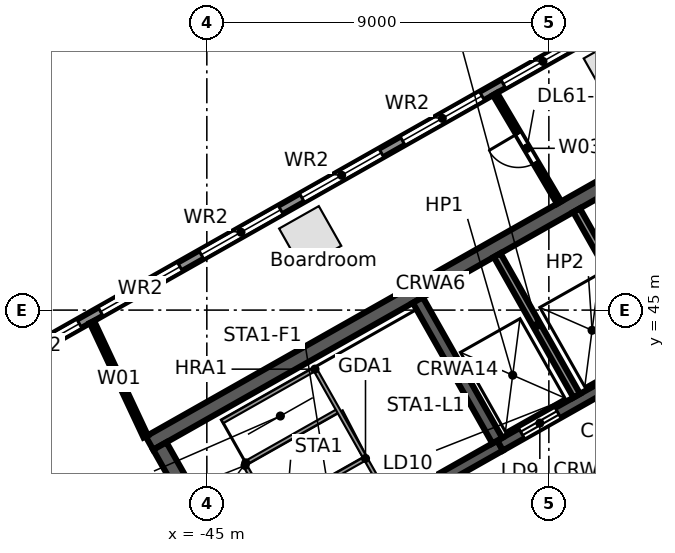
"""IFC4 building model, lengths in metres.
Left out: names, types, materials, properties, quantities, classifications, styles, units other than length and angle.
Written with IfcOpenShell. Run it as: python <this file> out.ifc"""

import sys

from ifc_helpers import new_model, si_unit, direction, frame, frame_2d, origin, origin_2d, place, context, subcontext, project, spatial, rectangle, extrude, element, fill, save


model = new_model("IFC4")
c1 = context("Model", 3, precision=1e-05, world=origin(), true_north=direction((0.0, 1.0)))
c2 = subcontext(c1, "Body", "Model", "MODEL_VIEW")
j1 = project(units=[si_unit("LENGTHUNIT", "METRE"), si_unit("PLANEANGLEUNIT", "RADIAN")], contexts=[c1])
p1 = place(None, origin())
s1 = spatial("IfcSite", under=j1, at=p1, CompositionType="ELEMENT")
p2 = place(p1, origin())
s2 = spatial("IfcBuilding", under=s1, at=p2, CompositionType="ELEMENT")
p3 = place(p2, frame((0.0, 0.0, 281.7)))
s3 = spatial("IfcBuildingStorey", under=s2, at=p3, CompositionType="ELEMENT", Elevation=281.7)
p4 = place(p3, frame((-34.334, 51.414, 0.0), z_axis=(0.0, 0.0, 1.0), x_axis=(-0.87035569594, -0.492423560103, 0.0)))
e1 = element("IfcColumn", 1, at=p4, inside=s3, PredefinedType="COLUMN", context=c2, shape_type="SweptSolid", body=[
    extrude(rectangle(XDim=1.1, YDim=1.1, at=origin_2d()), origin(), (0.0, 0.0, 1.0), 3.8),
])
p5 = place(p3, frame((-42.28, 46.919, 0.0), z_axis=(0.0, 0.0, 1.0), x_axis=(-0.87035569594, -0.492423560103, 0.0)))
e2 = element("IfcColumn", 2, at=p5, inside=s3, PredefinedType="COLUMN", context=c2, shape_type="SweptSolid", body=[
    extrude(rectangle(XDim=1.2, YDim=1.2, at=origin_2d()), origin(), (0.0, 0.0, 1.0), 3.8),
])
p6 = place(p3, frame((-58.732, 38.771, 0.0), z_axis=(0.0, 0.0, 1.0), x_axis=(0.870355615581, 0.492423702137, 0.0)))
e3 = element("IfcWall", 3, at=p6, inside=s3, PredefinedType="STANDARD", context=c2, shape_type="SweptSolid", body=[
    extrude(rectangle(XDim=64.052, YDim=0.25, at=frame_2d((32.026, 0.0))), origin(), (0.0, 0.0, 1.0), 3.45),
])
p7 = place(p6, frame((61.259, 0.0, 0.8)))
e4 = element("IfcOpeningElement", 4, at=p7, cuts=e3, PredefinedType="OPENING", context=c2, shape_type="SweptSolid", body=[
    extrude(rectangle(XDim=2.4, YDim=2.2, at=frame_2d((1.2, 1.1))), frame((0.0, 0.135, 0.0), z_axis=(0.0, -1.0, 0.0), x_axis=(1.0, 0.0, 0.0)), (0.0, 0.0, 1.0), 0.27),
])
p8 = place(p6, frame((58.216, 0.0, 0.8)))
e5 = element("IfcOpeningElement", 5, at=p8, cuts=e3, PredefinedType="OPENING", context=c2, shape_type="SweptSolid", body=[
    extrude(rectangle(XDim=2.4, YDim=2.2, at=frame_2d((1.2, 1.1))), frame((0.0, 0.135, 0.0), z_axis=(0.0, -1.0, 0.0), x_axis=(1.0, 0.0, 0.0)), (0.0, 0.0, 1.0), 0.27),
])
p9 = place(p6, frame((55.173, 0.0, 0.8)))
e6 = element("IfcOpeningElement", 6, at=p9, cuts=e3, PredefinedType="OPENING", context=c2, shape_type="SweptSolid", body=[
    extrude(rectangle(XDim=2.4, YDim=2.2, at=frame_2d((1.2, 1.1))), frame((0.0, 0.135, 0.0), z_axis=(0.0, -1.0, 0.0), x_axis=(1.0, 0.0, 0.0)), (0.0, 0.0, 1.0), 0.27),
])
p10 = place(p6, frame((52.129, 0.0, 0.8)))
e7 = element("IfcOpeningElement", 7, at=p10, cuts=e3, PredefinedType="OPENING", context=c2, shape_type="SweptSolid", body=[
    extrude(rectangle(XDim=2.4, YDim=2.2, at=frame_2d((1.2, 1.1))), frame((0.0, 0.135, 0.0), z_axis=(0.0, -1.0, 0.0), x_axis=(1.0, 0.0, 0.0)), (0.0, 0.0, 1.0), 0.27),
])
p11 = place(p6, frame((49.086, 0.0, 0.8)))
e8 = element("IfcOpeningElement", 8, at=p11, cuts=e3, PredefinedType="OPENING", context=c2, shape_type="SweptSolid", body=[
    extrude(rectangle(XDim=2.4, YDim=2.2, at=frame_2d((1.2, 1.1))), frame((0.0, 0.135, 0.0), z_axis=(0.0, -1.0, 0.0), x_axis=(1.0, 0.0, 0.0)), (0.0, 0.0, 1.0), 0.27),
])
p12 = place(p6, frame((46.043, 0.0, 0.8)))
e9 = element("IfcOpeningElement", 9, at=p12, cuts=e3, PredefinedType="OPENING", context=c2, shape_type="SweptSolid", body=[
    extrude(rectangle(XDim=2.4, YDim=2.2, at=frame_2d((1.2, 1.1))), frame((0.0, 0.135, 0.0), z_axis=(0.0, -1.0, 0.0), x_axis=(1.0, 0.0, 0.0)), (0.0, 0.0, 1.0), 0.27),
])
p13 = place(p6, frame((43.0, 0.0, 0.8)))
e10 = element("IfcOpeningElement", 10, at=p13, cuts=e3, PredefinedType="OPENING", context=c2, shape_type="SweptSolid", body=[
    extrude(rectangle(XDim=2.4, YDim=2.2, at=frame_2d((1.2, 1.1))), frame((0.0, 0.135, 0.0), z_axis=(0.0, -1.0, 0.0), x_axis=(1.0, 0.0, 0.0)), (0.0, 0.0, 1.0), 0.27),
])
p14 = place(p6, frame((39.956, 0.0, 0.8)))
e11 = element("IfcOpeningElement", 11, at=p14, cuts=e3, PredefinedType="OPENING", context=c2, shape_type="SweptSolid", body=[
    extrude(rectangle(XDim=2.4, YDim=2.2, at=frame_2d((1.2, 1.1))), frame((0.0, 0.135, 0.0), z_axis=(0.0, -1.0, 0.0), x_axis=(1.0, 0.0, 0.0)), (0.0, 0.0, 1.0), 0.27),
])
p15 = place(p6, frame((36.913, 0.0, 0.8)))
e12 = element("IfcOpeningElement", 12, at=p15, cuts=e3, PredefinedType="OPENING", context=c2, shape_type="SweptSolid", body=[
    extrude(rectangle(XDim=2.4, YDim=2.2, at=frame_2d((1.2, 1.1))), frame((0.0, 0.135, 0.0), z_axis=(0.0, -1.0, 0.0), x_axis=(1.0, 0.0, 0.0)), (0.0, 0.0, 1.0), 0.27),
])
p16 = place(p6, frame((33.87, 0.0, 0.8)))
e13 = element("IfcOpeningElement", 13, at=p16, cuts=e3, PredefinedType="OPENING", context=c2, shape_type="SweptSolid", body=[
    extrude(rectangle(XDim=2.4, YDim=2.2, at=frame_2d((1.2, 1.1))), frame((0.0, 0.135, 0.0), z_axis=(0.0, -1.0, 0.0), x_axis=(1.0, 0.0, 0.0)), (0.0, 0.0, 1.0), 0.27),
])
p17 = place(p6, frame((30.826, 0.0, 0.8)))
e14 = element("IfcOpeningElement", 14, at=p17, cuts=e3, PredefinedType="OPENING", context=c2, shape_type="SweptSolid", body=[
    extrude(rectangle(XDim=2.4, YDim=2.2, at=frame_2d((1.2, 1.1))), frame((0.0, 0.135, 0.0), z_axis=(0.0, -1.0, 0.0), x_axis=(1.0, 0.0, 0.0)), (0.0, 0.0, 1.0), 0.27),
])
p18 = place(p6, frame((27.783, 0.0, 0.8)))
e15 = element("IfcOpeningElement", 15, at=p18, cuts=e3, PredefinedType="OPENING", context=c2, shape_type="SweptSolid", body=[
    extrude(rectangle(XDim=2.4, YDim=2.2, at=frame_2d((1.2, 1.1))), frame((0.0, 0.135, 0.0), z_axis=(0.0, -1.0, 0.0), x_axis=(1.0, 0.0, 0.0)), (0.0, 0.0, 1.0), 0.27),
])
p19 = place(p6, frame((24.74, 0.0, 0.8)))
e16 = element("IfcOpeningElement", 16, at=p19, cuts=e3, PredefinedType="OPENING", context=c2, shape_type="SweptSolid", body=[
    extrude(rectangle(XDim=2.4, YDim=2.2, at=frame_2d((1.2, 1.1))), frame((0.0, 0.135, 0.0), z_axis=(0.0, -1.0, 0.0), x_axis=(1.0, 0.0, 0.0)), (0.0, 0.0, 1.0), 0.27),
])
p20 = place(p6, frame((21.696, 0.0, 0.8)))
e17 = element("IfcOpeningElement", 17, at=p20, cuts=e3, PredefinedType="OPENING", context=c2, shape_type="SweptSolid", body=[
    extrude(rectangle(XDim=2.4, YDim=2.2, at=frame_2d((1.2, 1.1))), frame((0.0, 0.135, 0.0), z_axis=(0.0, -1.0, 0.0), x_axis=(1.0, 0.0, 0.0)), (0.0, 0.0, 1.0), 0.27),
])
p21 = place(p6, frame((18.653, 0.0, 0.8)))
e18 = element("IfcOpeningElement", 18, at=p21, cuts=e3, PredefinedType="OPENING", context=c2, shape_type="SweptSolid", body=[
    extrude(rectangle(XDim=2.4, YDim=2.2, at=frame_2d((1.2, 1.1))), frame((0.0, 0.135, 0.0), z_axis=(0.0, -1.0, 0.0), x_axis=(1.0, 0.0, 0.0)), (0.0, 0.0, 1.0), 0.27),
])
p22 = place(p6, frame((15.61, 0.0, 0.8)))
e19 = element("IfcOpeningElement", 19, at=p22, cuts=e3, PredefinedType="OPENING", context=c2, shape_type="SweptSolid", body=[
    extrude(rectangle(XDim=2.4, YDim=2.2, at=frame_2d((1.2, 1.1))), frame((0.0, 0.135, 0.0), z_axis=(0.0, -1.0, 0.0), x_axis=(1.0, 0.0, 0.0)), (0.0, 0.0, 1.0), 0.27),
])
p23 = place(p6, frame((12.567, 0.0, 0.8)))
e20 = element("IfcOpeningElement", 20, at=p23, cuts=e3, PredefinedType="OPENING", context=c2, shape_type="SweptSolid", body=[
    extrude(rectangle(XDim=2.4, YDim=2.2, at=frame_2d((1.2, 1.1))), frame((0.0, 0.135, 0.0), z_axis=(0.0, -1.0, 0.0), x_axis=(1.0, 0.0, 0.0)), (0.0, 0.0, 1.0), 0.27),
])
p24 = place(p6, frame((9.523, 0.0, 0.8)))
e21 = element("IfcOpeningElement", 21, at=p24, cuts=e3, PredefinedType="OPENING", context=c2, shape_type="SweptSolid", body=[
    extrude(rectangle(XDim=2.4, YDim=2.2, at=frame_2d((1.2, 1.1))), frame((0.0, 0.135, 0.0), z_axis=(0.0, -1.0, 0.0), x_axis=(1.0, 0.0, 0.0)), (0.0, 0.0, 1.0), 0.27),
])
p25 = place(p6, frame((6.48, 0.0, 0.8)))
e22 = element("IfcOpeningElement", 22, at=p25, cuts=e3, PredefinedType="OPENING", context=c2, shape_type="SweptSolid", body=[
    extrude(rectangle(XDim=2.4, YDim=2.2, at=frame_2d((1.2, 1.1))), frame((0.0, 0.135, 0.0), z_axis=(0.0, -1.0, 0.0), x_axis=(1.0, 0.0, 0.0)), (0.0, 0.0, 1.0), 0.27),
])
p26 = place(p6, frame((3.437, 0.0, 0.8)))
e23 = element("IfcOpeningElement", 23, at=p26, cuts=e3, PredefinedType="OPENING", context=c2, shape_type="SweptSolid", body=[
    extrude(rectangle(XDim=2.4, YDim=2.2, at=frame_2d((1.2, 1.1))), frame((0.0, 0.135, 0.0), z_axis=(0.0, -1.0, 0.0), x_axis=(1.0, 0.0, 0.0)), (0.0, 0.0, 1.0), 0.27),
])
p27 = place(p6, frame((0.393, 0.0, 0.8)))
e24 = element("IfcOpeningElement", 24, at=p27, cuts=e3, PredefinedType="OPENING", context=c2, shape_type="SweptSolid", body=[
    extrude(rectangle(XDim=2.4, YDim=2.2, at=frame_2d((1.2, 1.1))), frame((0.0, 0.135, 0.0), z_axis=(0.0, -1.0, 0.0), x_axis=(1.0, 0.0, 0.0)), (0.0, 0.0, 1.0), 0.27),
])
p28 = place(p3, frame((-3.017, 46.293, 0.0), z_axis=(0.0, 0.0, 1.0), x_axis=(-0.870355474887, -0.492423950812, 0.0)))
e25 = element("IfcWall", 25, at=p28, inside=s3, PredefinedType="STANDARD", context=c2, shape_type="SweptSolid", body=[
    extrude(rectangle(XDim=40.34, YDim=0.25, at=frame_2d((20.17, 0.0))), origin(), (0.0, 0.0, 1.0), 3.45),
])
p29 = place(p28, frame((37.428, 0.0, 0.8)))
e26 = element("IfcOpeningElement", 26, at=p29, cuts=e25, PredefinedType="OPENING", context=c2, shape_type="SweptSolid", body=[
    extrude(rectangle(XDim=2.4, YDim=2.2, at=frame_2d((1.2, 1.1))), frame((0.0, 0.135, 0.0), z_axis=(0.0, -1.0, 0.0), x_axis=(1.0, 0.0, 0.0)), (0.0, 0.0, 1.0), 0.27),
])
p30 = place(p28, frame((34.372, 0.0, 0.0)))
e27 = element("IfcOpeningElement", 27, at=p30, cuts=e25, PredefinedType="OPENING", context=c2, shape_type="SweptSolid", body=[
    extrude(rectangle(XDim=1.8, YDim=2.4, at=frame_2d((0.9, 1.2))), frame((0.0, 0.135, 0.0), z_axis=(0.0, -1.0, 0.0), x_axis=(1.0, 0.0, 0.0)), (0.0, 0.0, 1.0), 0.27),
])
p31 = place(p28, frame((30.716, 0.0, 0.8)))
e28 = element("IfcOpeningElement", 28, at=p31, cuts=e25, PredefinedType="OPENING", context=c2, shape_type="SweptSolid", body=[
    extrude(rectangle(XDim=2.4, YDim=2.2, at=frame_2d((1.2, 1.1))), frame((0.0, 0.135, 0.0), z_axis=(0.0, -1.0, 0.0), x_axis=(1.0, 0.0, 0.0)), (0.0, 0.0, 1.0), 0.27),
])
p32 = place(p28, frame((27.36, 0.0, 0.8)))
e29 = element("IfcOpeningElement", 29, at=p32, cuts=e25, PredefinedType="OPENING", context=c2, shape_type="SweptSolid", body=[
    extrude(rectangle(XDim=2.4, YDim=2.2, at=frame_2d((1.2, 1.1))), frame((0.0, 0.135, 0.0), z_axis=(0.0, -1.0, 0.0), x_axis=(1.0, 0.0, 0.0)), (0.0, 0.0, 1.0), 0.27),
])
p33 = place(p28, frame((24.304, 0.0, 0.0)))
e30 = element("IfcOpeningElement", 30, at=p33, cuts=e25, PredefinedType="OPENING", context=c2, shape_type="SweptSolid", body=[
    extrude(rectangle(XDim=1.8, YDim=2.4, at=frame_2d((0.9, 1.2))), frame((0.0, 0.135, 0.0), z_axis=(0.0, -1.0, 0.0), x_axis=(1.0, 0.0, 0.0)), (0.0, 0.0, 1.0), 0.27),
])
p34 = place(p28, frame((20.648, 0.0, 0.8)))
e31 = element("IfcOpeningElement", 31, at=p34, cuts=e25, PredefinedType="OPENING", context=c2, shape_type="SweptSolid", body=[
    extrude(rectangle(XDim=2.4, YDim=2.2, at=frame_2d((1.2, 1.1))), frame((0.0, 0.135, 0.0), z_axis=(0.0, -1.0, 0.0), x_axis=(1.0, 0.0, 0.0)), (0.0, 0.0, 1.0), 0.27),
])
p35 = place(p28, frame((17.292, 0.0, 0.8)))
e32 = element("IfcOpeningElement", 32, at=p35, cuts=e25, PredefinedType="OPENING", context=c2, shape_type="SweptSolid", body=[
    extrude(rectangle(XDim=2.4, YDim=2.2, at=frame_2d((1.2, 1.1))), frame((0.0, 0.135, 0.0), z_axis=(0.0, -1.0, 0.0), x_axis=(1.0, 0.0, 0.0)), (0.0, 0.0, 1.0), 0.27),
])
p36 = place(p28, frame((14.236, 0.0, 0.0)))
e33 = element("IfcOpeningElement", 33, at=p36, cuts=e25, PredefinedType="OPENING", context=c2, shape_type="SweptSolid", body=[
    extrude(rectangle(XDim=1.8, YDim=2.4, at=frame_2d((0.9, 1.2))), frame((0.0, 0.135, 0.0), z_axis=(0.0, -1.0, 0.0), x_axis=(1.0, 0.0, 0.0)), (0.0, 0.0, 1.0), 0.27),
])
p37 = place(p28, frame((10.58, 0.0, 0.8)))
e34 = element("IfcOpeningElement", 34, at=p37, cuts=e25, PredefinedType="OPENING", context=c2, shape_type="SweptSolid", body=[
    extrude(rectangle(XDim=2.4, YDim=2.2, at=frame_2d((1.2, 1.1))), frame((0.0, 0.135, 0.0), z_axis=(0.0, -1.0, 0.0), x_axis=(1.0, 0.0, 0.0)), (0.0, 0.0, 1.0), 0.27),
])
p38 = place(p28, frame((7.224, 0.0, 0.8)))
e35 = element("IfcOpeningElement", 35, at=p38, cuts=e25, PredefinedType="OPENING", context=c2, shape_type="SweptSolid", body=[
    extrude(rectangle(XDim=2.4, YDim=2.2, at=frame_2d((1.2, 1.1))), frame((0.0, 0.135, 0.0), z_axis=(0.0, -1.0, 0.0), x_axis=(1.0, 0.0, 0.0)), (0.0, 0.0, 1.0), 0.27),
])
p39 = place(p28, frame((4.168, 0.0, 0.0)))
e36 = element("IfcOpeningElement", 36, at=p39, cuts=e25, PredefinedType="OPENING", context=c2, shape_type="SweptSolid", body=[
    extrude(rectangle(XDim=1.8, YDim=2.4, at=frame_2d((0.9, 1.2))), frame((0.0, 0.135, 0.0), z_axis=(0.0, -1.0, 0.0), x_axis=(1.0, 0.0, 0.0)), (0.0, 0.0, 1.0), 0.27),
])
p40 = place(p28, frame((0.512, 0.0, 0.8)))
e37 = element("IfcOpeningElement", 37, at=p40, cuts=e25, PredefinedType="OPENING", context=c2, shape_type="SweptSolid", body=[
    extrude(rectangle(XDim=2.4, YDim=2.2, at=frame_2d((1.2, 1.1))), frame((0.0, 0.135, 0.0), z_axis=(0.0, -1.0, 0.0), x_axis=(1.0, 0.0, 0.0)), (0.0, 0.0, 1.0), 0.27),
])
p41 = place(p3, frame((-43.897, 37.692, 0.0), z_axis=(0.0, 0.0, 1.0), x_axis=(0.870356351998, 0.492422400523, 0.0)))
e38 = element("IfcWall", 38, at=p41, inside=s3, PredefinedType="SOLIDWALL", context=c2, shape_type="SweptSolid", body=[
    extrude(rectangle(XDim=7.6, YDim=0.3, at=frame_2d((3.8, 0.0))), origin(), (0.0, 0.0, 1.0), 3.45),
])
p42 = place(p41, frame((0.4, 0.0, 0.0)))
e39 = element("IfcOpeningElement", 39, at=p42, cuts=e38, PredefinedType="OPENING", context=c2, shape_type="SweptSolid", body=[
    extrude(rectangle(XDim=1.0, YDim=2.1, at=frame_2d((0.5, 1.05))), frame((0.0, 0.16, 0.0), z_axis=(0.0, -1.0, 0.0), x_axis=(1.0, 0.0, 0.0)), (0.0, 0.0, 1.0), 0.32),
])
p43 = place(p3, frame((-37.282, 41.435, 0.0), z_axis=(0.0, 0.0, 1.0), x_axis=(0.870361315115, 0.492413628113, 0.0)))
e40 = element("IfcWall", 40, at=p43, inside=s3, PredefinedType="SOLIDWALL", context=c2, shape_type="SweptSolid", body=[
    extrude(rectangle(XDim=8.6, YDim=0.3, at=frame_2d((4.3, 0.0))), origin(), (0.0, 0.0, 1.0), 3.45),
])
p44 = place(p43, frame((0.65, 0.0, 0.0)))
e41 = element("IfcOpeningElement", 41, at=p44, cuts=e40, PredefinedType="OPENING", context=c2, shape_type="SweptSolid", body=[
    extrude(rectangle(XDim=1.1, YDim=2.1, at=frame_2d((0.55, 1.05))), frame((0.0, 0.16, 0.0), z_axis=(0.0, -1.0, 0.0), x_axis=(1.0, 0.0, 0.0)), (0.0, 0.0, 1.0), 0.32),
])
p45 = place(p43, frame((3.05, 0.0, 0.0)))
e42 = element("IfcOpeningElement", 42, at=p45, cuts=e40, PredefinedType="OPENING", context=c2, shape_type="SweptSolid", body=[
    extrude(rectangle(XDim=1.1, YDim=2.1, at=frame_2d((0.55, 1.05))), frame((0.0, 0.16, 0.0), z_axis=(0.0, -1.0, 0.0), x_axis=(1.0, 0.0, 0.0)), (0.0, 0.0, 1.0), 0.32),
])
p46 = place(p43, frame((6.2, 0.0, 0.0)))
e43 = element("IfcOpeningElement", 43, at=p46, cuts=e40, PredefinedType="OPENING", context=c2, shape_type="SweptSolid", body=[
    extrude(rectangle(XDim=1.1, YDim=2.1, at=frame_2d((0.55, 1.05))), frame((0.0, 0.16, 0.0), z_axis=(0.0, -1.0, 0.0), x_axis=(1.0, 0.0, 0.0)), (0.0, 0.0, 1.0), 0.32),
])
p47 = place(p3, frame((-46.51, 41.499, 0.0), z_axis=(0.0, 0.0, 1.0), x_axis=(0.870356271124, 0.492422543467, 0.0)))
e44 = element("IfcWall", 44, at=p47, inside=s3, PredefinedType="SOLIDWALL", context=c2, shape_type="SweptSolid", body=[
    extrude(rectangle(XDim=17.0, YDim=0.4, at=frame_2d((8.5, 0.0))), origin(), (0.0, 0.0, 1.0), 3.45),
])
p48 = place(p3, frame((-46.238, 41.423, 0.0), z_axis=(0.0, 0.0, 1.0), x_axis=(0.492421663121, -0.870356769198, 0.0)))
e45 = element("IfcWall", 45, at=p48, inside=s3, PredefinedType="SOLIDWALL", context=c2, shape_type="SweptSolid", body=[
    extrude(rectangle(XDim=13.2, YDim=0.4, at=frame_2d((6.6, 0.0))), origin(), (0.0, 0.0, 1.0), 3.45),
])
p49 = place(p3, frame((-39.449, 45.264, 0.0), z_axis=(0.0, 0.0, 1.0), x_axis=(0.492422543467, -0.870356271124, 0.0)))
e46 = element("IfcWall", 46, at=p49, inside=s3, PredefinedType="SOLIDWALL", context=c2, shape_type="SweptSolid", body=[
    extrude(rectangle(XDim=4.25, YDim=0.3, at=frame_2d((2.125, 0.0))), origin(), (0.0, 0.0, 1.0), 3.45),
])
for number, where, z_axis, x_axis in (
    (47, (-37.36, 46.446, 0.0), (0.0, 0.0, 1.0), (0.492, -0.87, 0.0)),
    (48, (-35.271, 47.628, 0.0), (0.0, 0.0, 1.0), (0.492, -0.87, 0.0)),
):
    element("IfcWall", number, at=place(p3, frame(where, z_axis=z_axis, x_axis=x_axis)), inside=s3, PredefinedType="SOLIDWALL", context=c2, shape_type="SweptSolid", body=[
        extrude(rectangle(XDim=4.25, YDim=0.2, at=frame_2d((2.125, 0.0))), origin(), (0.0, 0.0, 1.0), 3.45),
    ])
p50 = place(p3, frame((-48.022, 44.687, 0.0), z_axis=(0.0, 0.0, 1.0), x_axis=(0.424510917438, -0.905422818895, 0.0)))
e49 = element("IfcWall", 49, at=p50, inside=s3, PredefinedType="PARTITIONING", context=c2, shape_type="SweptSolid", body=[
    extrude(rectangle(XDim=3.329, YDim=0.125, at=frame_2d((1.665, 0.0))), origin(), (0.0, 0.0, 1.0), 2.73),
])
p51 = place(p3, frame((-37.416, 50.687, 0.0), z_axis=(0.0, 0.0, 1.0), x_axis=(0.508176683483, -0.861252842297, 0.0)))
e50 = element("IfcWall", 50, at=p51, inside=s3, PredefinedType="PARTITIONING", context=c2, shape_type="SweptSolid", body=[
    extrude(rectangle(XDim=3.32, YDim=0.125, at=frame_2d((1.66, 0.0))), origin(), (0.0, 0.0, 1.0), 2.73),
])
p52 = place(p51, frame((1.2, 0.0, 0.0)))
e51 = element("IfcOpeningElement", 51, at=p52, cuts=e50, PredefinedType="OPENING", context=c2, shape_type="SweptSolid", body=[
    extrude(rectangle(XDim=0.9, YDim=2.1, at=frame_2d((0.45, 1.05))), frame((0.0, 0.073, 0.0), z_axis=(0.0, -1.0, 0.0), x_axis=(1.0, 0.0, 0.0)), (0.0, 0.0, 1.0), 0.145),
])
p53 = place(p19, origin())
e52 = element("IfcWindow", 52, at=p53, inside=s3, PartitioningType="SINGLE_PANEL", PredefinedType="WINDOW", context=c2, shape_type="SweptSolid", body=[
    extrude(rectangle(XDim=2.4, YDim=2.2, at=frame_2d((1.2, 1.1))), frame((0.0, 0.03, 0.0), z_axis=(0.0, -1.0, 0.0), x_axis=(1.0, 0.0, 0.0)), (0.0, 0.0, 1.0), 0.06),
])
fill(e16, e52)
p54 = place(p20, origin())
e53 = element("IfcWindow", 53, at=p54, inside=s3, PartitioningType="SINGLE_PANEL", PredefinedType="WINDOW", context=c2, shape_type="SweptSolid", body=[
    extrude(rectangle(XDim=2.4, YDim=2.2, at=frame_2d((1.2, 1.1))), frame((0.0, 0.03, 0.0), z_axis=(0.0, -1.0, 0.0), x_axis=(1.0, 0.0, 0.0)), (0.0, 0.0, 1.0), 0.06),
])
fill(e17, e53)
p55 = place(p21, origin())
e54 = element("IfcWindow", 54, at=p55, inside=s3, PartitioningType="SINGLE_PANEL", PredefinedType="WINDOW", context=c2, shape_type="SweptSolid", body=[
    extrude(rectangle(XDim=2.4, YDim=2.2, at=frame_2d((1.2, 1.1))), frame((0.0, 0.03, 0.0), z_axis=(0.0, -1.0, 0.0), x_axis=(1.0, 0.0, 0.0)), (0.0, 0.0, 1.0), 0.06),
])
fill(e18, e54)
p56 = place(p22, origin())
e55 = element("IfcWindow", 55, at=p56, inside=s3, PartitioningType="SINGLE_PANEL", PredefinedType="WINDOW", context=c2, shape_type="SweptSolid", body=[
    extrude(rectangle(XDim=2.4, YDim=2.2, at=frame_2d((1.2, 1.1))), frame((0.0, 0.03, 0.0), z_axis=(0.0, -1.0, 0.0), x_axis=(1.0, 0.0, 0.0)), (0.0, 0.0, 1.0), 0.06),
])
fill(e19, e55)
p57 = place(p23, origin())
e56 = element("IfcWindow", 56, at=p57, inside=s3, PartitioningType="SINGLE_PANEL", PredefinedType="WINDOW", context=c2, shape_type="SweptSolid", body=[
    extrude(rectangle(XDim=2.4, YDim=2.2, at=frame_2d((1.2, 1.1))), frame((0.0, 0.03, 0.0), z_axis=(0.0, -1.0, 0.0), x_axis=(1.0, 0.0, 0.0)), (0.0, 0.0, 1.0), 0.06),
])
fill(e20, e56)
p58 = place(p24, origin())
e57 = element("IfcWindow", 57, at=p58, inside=s3, PartitioningType="SINGLE_PANEL", PredefinedType="WINDOW", context=c2, shape_type="SweptSolid", body=[
    extrude(rectangle(XDim=2.4, YDim=2.2, at=frame_2d((1.2, 1.1))), frame((0.0, 0.03, 0.0), z_axis=(0.0, -1.0, 0.0), x_axis=(1.0, 0.0, 0.0)), (0.0, 0.0, 1.0), 0.06),
])
fill(e21, e57)
p59 = place(p44, origin())
e58 = element("IfcDoor", 58, at=p59, inside=s3, OperationType="DOUBLE_DOOR_SLIDING", PredefinedType="DOOR", context=c2, shape_type="SweptSolid", body=[
    extrude(rectangle(XDim=1.1, YDim=2.1, at=frame_2d((0.55, 1.05))), frame((0.0, 0.025, 0.0), z_axis=(0.0, -1.0, 0.0), x_axis=(1.0, 0.0, 0.0)), (0.0, 0.0, 1.0), 0.05),
])
fill(e41, e58)
p60 = place(p52, frame((0.9, 0.0, 0.0), z_axis=(0.0, 0.0, 1.0), x_axis=(-1.0, 0.0, 0.0)))
e59 = element("IfcDoor", 59, at=p60, inside=s3, OperationType="SINGLE_SWING_RIGHT", PredefinedType="DOOR", context=c2, shape_type="SweptSolid", body=[
    extrude(rectangle(XDim=0.9, YDim=2.1, at=frame_2d((0.45, 1.05))), frame((0.0, 0.025, 0.0), z_axis=(0.0, -1.0, 0.0), x_axis=(1.0, 0.0, 0.0)), (0.0, 0.0, 1.0), 0.05),
])
fill(e51, e59)
save(model, sys.argv[1])
